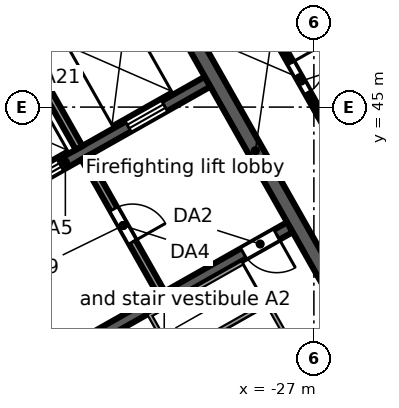
"""IFC4 building model, lengths in metres.
Left out: names, types, materials, properties, quantities, classifications, styles, units other than length and angle.
Written with IfcOpenShell. Run it as: python <this file> out.ifc"""

import sys

from ifc_helpers import new_model, si_unit, direction, frame, frame_2d, origin, place, context, subcontext, project, spatial, rectangle, extrude, element, fill, save


model = new_model("IFC4")
c1 = context("Model", 3, precision=1e-05, world=origin(), true_north=direction((0.0, 1.0)))
c2 = subcontext(c1, "Body", "Model", "MODEL_VIEW")
j1 = project(units=[si_unit("LENGTHUNIT", "METRE"), si_unit("PLANEANGLEUNIT", "RADIAN")], contexts=[c1])
p1 = place(None, origin())
s1 = spatial("IfcSite", under=j1, at=p1, CompositionType="ELEMENT")
p2 = place(p1, origin())
s2 = spatial("IfcBuilding", under=s1, at=p2, CompositionType="ELEMENT")
p3 = place(p2, frame((0.0, 0.0, 277.9)))
s3 = spatial("IfcBuildingStorey", under=s2, at=p3, CompositionType="ELEMENT", Elevation=277.9)
p4 = place(p3, frame((-58.732, 38.771, 0.0), z_axis=(0.0, 0.0, 1.0), x_axis=(0.870355615581, 0.492423702137, 0.0)))
e1 = element("IfcWall", 1, at=p4, inside=s3, PredefinedType="STANDARD", context=c2, shape_type="SweptSolid", body=[
    extrude(rectangle(XDim=64.052, YDim=0.25, at=frame_2d((32.026, 0.0))), origin(), (0.0, 0.0, 1.0), 3.52),
])
p5 = place(p4, frame((61.259, 0.0, 0.8)))
e2 = element("IfcOpeningElement", 2, at=p5, cuts=e1, PredefinedType="OPENING", context=c2, shape_type="SweptSolid", body=[
    extrude(rectangle(XDim=2.4, YDim=2.2, at=frame_2d((1.2, 1.1))), frame((0.0, 0.135, 0.0), z_axis=(0.0, -1.0, 0.0), x_axis=(1.0, 0.0, 0.0)), (0.0, 0.0, 1.0), 0.27),
])
p6 = place(p4, frame((58.216, 0.0, 0.8)))
e3 = element("IfcOpeningElement", 3, at=p6, cuts=e1, PredefinedType="OPENING", context=c2, shape_type="SweptSolid", body=[
    extrude(rectangle(XDim=2.4, YDim=2.2, at=frame_2d((1.2, 1.1))), frame((0.0, 0.135, 0.0), z_axis=(0.0, -1.0, 0.0), x_axis=(1.0, 0.0, 0.0)), (0.0, 0.0, 1.0), 0.27),
])
p7 = place(p4, frame((55.173, 0.0, 0.8)))
e4 = element("IfcOpeningElement", 4, at=p7, cuts=e1, PredefinedType="OPENING", context=c2, shape_type="SweptSolid", body=[
    extrude(rectangle(XDim=2.4, YDim=2.2, at=frame_2d((1.2, 1.1))), frame((0.0, 0.135, 0.0), z_axis=(0.0, -1.0, 0.0), x_axis=(1.0, 0.0, 0.0)), (0.0, 0.0, 1.0), 0.27),
])
p8 = place(p4, frame((52.129, 0.0, 0.8)))
e5 = element("IfcOpeningElement", 5, at=p8, cuts=e1, PredefinedType="OPENING", context=c2, shape_type="SweptSolid", body=[
    extrude(rectangle(XDim=2.4, YDim=2.2, at=frame_2d((1.2, 1.1))), frame((0.0, 0.135, 0.0), z_axis=(0.0, -1.0, 0.0), x_axis=(1.0, 0.0, 0.0)), (0.0, 0.0, 1.0), 0.27),
])
p9 = place(p4, frame((49.086, 0.0, 0.8)))
e6 = element("IfcOpeningElement", 6, at=p9, cuts=e1, PredefinedType="OPENING", context=c2, shape_type="SweptSolid", body=[
    extrude(rectangle(XDim=2.4, YDim=2.2, at=frame_2d((1.2, 1.1))), frame((0.0, 0.135, 0.0), z_axis=(0.0, -1.0, 0.0), x_axis=(1.0, 0.0, 0.0)), (0.0, 0.0, 1.0), 0.27),
])
p10 = place(p4, frame((46.043, 0.0, 0.8)))
e7 = element("IfcOpeningElement", 7, at=p10, cuts=e1, PredefinedType="OPENING", context=c2, shape_type="SweptSolid", body=[
    extrude(rectangle(XDim=2.4, YDim=2.2, at=frame_2d((1.2, 1.1))), frame((0.0, 0.135, 0.0), z_axis=(0.0, -1.0, 0.0), x_axis=(1.0, 0.0, 0.0)), (0.0, 0.0, 1.0), 0.27),
])
p11 = place(p4, frame((43.0, 0.0, 0.8)))
e8 = element("IfcOpeningElement", 8, at=p11, cuts=e1, PredefinedType="OPENING", context=c2, shape_type="SweptSolid", body=[
    extrude(rectangle(XDim=2.4, YDim=2.2, at=frame_2d((1.2, 1.1))), frame((0.0, 0.135, 0.0), z_axis=(0.0, -1.0, 0.0), x_axis=(1.0, 0.0, 0.0)), (0.0, 0.0, 1.0), 0.27),
])
p12 = place(p4, frame((39.956, 0.0, 0.8)))
e9 = element("IfcOpeningElement", 9, at=p12, cuts=e1, PredefinedType="OPENING", context=c2, shape_type="SweptSolid", body=[
    extrude(rectangle(XDim=2.4, YDim=2.2, at=frame_2d((1.2, 1.1))), frame((0.0, 0.135, 0.0), z_axis=(0.0, -1.0, 0.0), x_axis=(1.0, 0.0, 0.0)), (0.0, 0.0, 1.0), 0.27),
])
p13 = place(p4, frame((36.913, 0.0, 0.8)))
e10 = element("IfcOpeningElement", 10, at=p13, cuts=e1, PredefinedType="OPENING", context=c2, shape_type="SweptSolid", body=[
    extrude(rectangle(XDim=2.4, YDim=2.2, at=frame_2d((1.2, 1.1))), frame((0.0, 0.135, 0.0), z_axis=(0.0, -1.0, 0.0), x_axis=(1.0, 0.0, 0.0)), (0.0, 0.0, 1.0), 0.27),
])
p14 = place(p4, frame((33.87, 0.0, 0.8)))
e11 = element("IfcOpeningElement", 11, at=p14, cuts=e1, PredefinedType="OPENING", context=c2, shape_type="SweptSolid", body=[
    extrude(rectangle(XDim=2.4, YDim=2.2, at=frame_2d((1.2, 1.1))), frame((0.0, 0.135, 0.0), z_axis=(0.0, -1.0, 0.0), x_axis=(1.0, 0.0, 0.0)), (0.0, 0.0, 1.0), 0.27),
])
p15 = place(p4, frame((30.826, 0.0, 0.8)))
e12 = element("IfcOpeningElement", 12, at=p15, cuts=e1, PredefinedType="OPENING", context=c2, shape_type="SweptSolid", body=[
    extrude(rectangle(XDim=2.4, YDim=2.2, at=frame_2d((1.2, 1.1))), frame((0.0, 0.135, 0.0), z_axis=(0.0, -1.0, 0.0), x_axis=(1.0, 0.0, 0.0)), (0.0, 0.0, 1.0), 0.27),
])
p16 = place(p4, frame((27.783, 0.0, 0.8)))
e13 = element("IfcOpeningElement", 13, at=p16, cuts=e1, PredefinedType="OPENING", context=c2, shape_type="SweptSolid", body=[
    extrude(rectangle(XDim=2.4, YDim=2.2, at=frame_2d((1.2, 1.1))), frame((0.0, 0.135, 0.0), z_axis=(0.0, -1.0, 0.0), x_axis=(1.0, 0.0, 0.0)), (0.0, 0.0, 1.0), 0.27),
])
p17 = place(p4, frame((24.74, 0.0, 0.8)))
e14 = element("IfcOpeningElement", 14, at=p17, cuts=e1, PredefinedType="OPENING", context=c2, shape_type="SweptSolid", body=[
    extrude(rectangle(XDim=2.4, YDim=2.2, at=frame_2d((1.2, 1.1))), frame((0.0, 0.135, 0.0), z_axis=(0.0, -1.0, 0.0), x_axis=(1.0, 0.0, 0.0)), (0.0, 0.0, 1.0), 0.27),
])
p18 = place(p4, frame((21.696, 0.0, 0.8)))
e15 = element("IfcOpeningElement", 15, at=p18, cuts=e1, PredefinedType="OPENING", context=c2, shape_type="SweptSolid", body=[
    extrude(rectangle(XDim=2.4, YDim=2.2, at=frame_2d((1.2, 1.1))), frame((0.0, 0.135, 0.0), z_axis=(0.0, -1.0, 0.0), x_axis=(1.0, 0.0, 0.0)), (0.0, 0.0, 1.0), 0.27),
])
p19 = place(p4, frame((18.653, 0.0, 0.8)))
e16 = element("IfcOpeningElement", 16, at=p19, cuts=e1, PredefinedType="OPENING", context=c2, shape_type="SweptSolid", body=[
    extrude(rectangle(XDim=2.4, YDim=2.2, at=frame_2d((1.2, 1.1))), frame((0.0, 0.135, 0.0), z_axis=(0.0, -1.0, 0.0), x_axis=(1.0, 0.0, 0.0)), (0.0, 0.0, 1.0), 0.27),
])
p20 = place(p4, frame((15.61, 0.0, 0.8)))
e17 = element("IfcOpeningElement", 17, at=p20, cuts=e1, PredefinedType="OPENING", context=c2, shape_type="SweptSolid", body=[
    extrude(rectangle(XDim=2.4, YDim=2.2, at=frame_2d((1.2, 1.1))), frame((0.0, 0.135, 0.0), z_axis=(0.0, -1.0, 0.0), x_axis=(1.0, 0.0, 0.0)), (0.0, 0.0, 1.0), 0.27),
])
p21 = place(p4, frame((12.567, 0.0, 0.8)))
e18 = element("IfcOpeningElement", 18, at=p21, cuts=e1, PredefinedType="OPENING", context=c2, shape_type="SweptSolid", body=[
    extrude(rectangle(XDim=2.4, YDim=2.2, at=frame_2d((1.2, 1.1))), frame((0.0, 0.135, 0.0), z_axis=(0.0, -1.0, 0.0), x_axis=(1.0, 0.0, 0.0)), (0.0, 0.0, 1.0), 0.27),
])
p22 = place(p4, frame((9.523, 0.0, 0.8)))
e19 = element("IfcOpeningElement", 19, at=p22, cuts=e1, PredefinedType="OPENING", context=c2, shape_type="SweptSolid", body=[
    extrude(rectangle(XDim=2.4, YDim=2.2, at=frame_2d((1.2, 1.1))), frame((0.0, 0.135, 0.0), z_axis=(0.0, -1.0, 0.0), x_axis=(1.0, 0.0, 0.0)), (0.0, 0.0, 1.0), 0.27),
])
p23 = place(p4, frame((6.48, 0.0, 0.8)))
e20 = element("IfcOpeningElement", 20, at=p23, cuts=e1, PredefinedType="OPENING", context=c2, shape_type="SweptSolid", body=[
    extrude(rectangle(XDim=2.4, YDim=2.2, at=frame_2d((1.2, 1.1))), frame((0.0, 0.135, 0.0), z_axis=(0.0, -1.0, 0.0), x_axis=(1.0, 0.0, 0.0)), (0.0, 0.0, 1.0), 0.27),
])
p24 = place(p4, frame((3.437, 0.0, 0.8)))
e21 = element("IfcOpeningElement", 21, at=p24, cuts=e1, PredefinedType="OPENING", context=c2, shape_type="SweptSolid", body=[
    extrude(rectangle(XDim=2.4, YDim=2.2, at=frame_2d((1.2, 1.1))), frame((0.0, 0.135, 0.0), z_axis=(0.0, -1.0, 0.0), x_axis=(1.0, 0.0, 0.0)), (0.0, 0.0, 1.0), 0.27),
])
p25 = place(p4, frame((0.393, 0.0, 0.8)))
e22 = element("IfcOpeningElement", 22, at=p25, cuts=e1, PredefinedType="OPENING", context=c2, shape_type="SweptSolid", body=[
    extrude(rectangle(XDim=2.4, YDim=2.2, at=frame_2d((1.2, 1.1))), frame((0.0, 0.135, 0.0), z_axis=(0.0, -1.0, 0.0), x_axis=(1.0, 0.0, 0.0)), (0.0, 0.0, 1.0), 0.27),
])
p26 = place(p3, frame((-3.017, 46.293, 0.0), z_axis=(0.0, 0.0, 1.0), x_axis=(-0.870355474887, -0.492423950812, 0.0)))
e23 = element("IfcWall", 23, at=p26, inside=s3, PredefinedType="STANDARD", context=c2, shape_type="SweptSolid", body=[
    extrude(rectangle(XDim=40.34, YDim=0.25, at=frame_2d((20.17, 0.0))), origin(), (0.0, 0.0, 1.0), 3.52),
])
p27 = place(p26, frame((37.428, 0.0, 0.8)))
e24 = element("IfcOpeningElement", 24, at=p27, cuts=e23, PredefinedType="OPENING", context=c2, shape_type="SweptSolid", body=[
    extrude(rectangle(XDim=2.4, YDim=2.2, at=frame_2d((1.2, 1.1))), frame((0.0, 0.135, 0.0), z_axis=(0.0, -1.0, 0.0), x_axis=(1.0, 0.0, 0.0)), (0.0, 0.0, 1.0), 0.27),
])
p28 = place(p26, frame((34.372, 0.0, 0.0)))
e25 = element("IfcOpeningElement", 25, at=p28, cuts=e23, PredefinedType="OPENING", context=c2, shape_type="SweptSolid", body=[
    extrude(rectangle(XDim=1.8, YDim=2.4, at=frame_2d((0.9, 1.2))), frame((0.0, 0.135, 0.0), z_axis=(0.0, -1.0, 0.0), x_axis=(1.0, 0.0, 0.0)), (0.0, 0.0, 1.0), 0.27),
])
p29 = place(p26, frame((30.716, 0.0, 0.8)))
e26 = element("IfcOpeningElement", 26, at=p29, cuts=e23, PredefinedType="OPENING", context=c2, shape_type="SweptSolid", body=[
    extrude(rectangle(XDim=2.4, YDim=2.2, at=frame_2d((1.2, 1.1))), frame((0.0, 0.135, 0.0), z_axis=(0.0, -1.0, 0.0), x_axis=(1.0, 0.0, 0.0)), (0.0, 0.0, 1.0), 0.27),
])
p30 = place(p26, frame((27.36, 0.0, 0.8)))
e27 = element("IfcOpeningElement", 27, at=p30, cuts=e23, PredefinedType="OPENING", context=c2, shape_type="SweptSolid", body=[
    extrude(rectangle(XDim=2.4, YDim=2.2, at=frame_2d((1.2, 1.1))), frame((0.0, 0.135, 0.0), z_axis=(0.0, -1.0, 0.0), x_axis=(1.0, 0.0, 0.0)), (0.0, 0.0, 1.0), 0.27),
])
p31 = place(p26, frame((24.304, 0.0, 0.0)))
e28 = element("IfcOpeningElement", 28, at=p31, cuts=e23, PredefinedType="OPENING", context=c2, shape_type="SweptSolid", body=[
    extrude(rectangle(XDim=1.8, YDim=2.4, at=frame_2d((0.9, 1.2))), frame((0.0, 0.135, 0.0), z_axis=(0.0, -1.0, 0.0), x_axis=(1.0, 0.0, 0.0)), (0.0, 0.0, 1.0), 0.27),
])
p32 = place(p26, frame((20.648, 0.0, 0.8)))
e29 = element("IfcOpeningElement", 29, at=p32, cuts=e23, PredefinedType="OPENING", context=c2, shape_type="SweptSolid", body=[
    extrude(rectangle(XDim=2.4, YDim=2.2, at=frame_2d((1.2, 1.1))), frame((0.0, 0.135, 0.0), z_axis=(0.0, -1.0, 0.0), x_axis=(1.0, 0.0, 0.0)), (0.0, 0.0, 1.0), 0.27),
])
p33 = place(p26, frame((17.292, 0.0, 0.8)))
e30 = element("IfcOpeningElement", 30, at=p33, cuts=e23, PredefinedType="OPENING", context=c2, shape_type="SweptSolid", body=[
    extrude(rectangle(XDim=2.4, YDim=2.2, at=frame_2d((1.2, 1.1))), frame((0.0, 0.135, 0.0), z_axis=(0.0, -1.0, 0.0), x_axis=(1.0, 0.0, 0.0)), (0.0, 0.0, 1.0), 0.27),
])
p34 = place(p26, frame((14.236, 0.0, 0.0)))
e31 = element("IfcOpeningElement", 31, at=p34, cuts=e23, PredefinedType="OPENING", context=c2, shape_type="SweptSolid", body=[
    extrude(rectangle(XDim=1.8, YDim=2.4, at=frame_2d((0.9, 1.2))), frame((0.0, 0.135, 0.0), z_axis=(0.0, -1.0, 0.0), x_axis=(1.0, 0.0, 0.0)), (0.0, 0.0, 1.0), 0.27),
])
p35 = place(p26, frame((10.58, 0.0, 0.8)))
e32 = element("IfcOpeningElement", 32, at=p35, cuts=e23, PredefinedType="OPENING", context=c2, shape_type="SweptSolid", body=[
    extrude(rectangle(XDim=2.4, YDim=2.2, at=frame_2d((1.2, 1.1))), frame((0.0, 0.135, 0.0), z_axis=(0.0, -1.0, 0.0), x_axis=(1.0, 0.0, 0.0)), (0.0, 0.0, 1.0), 0.27),
])
p36 = place(p26, frame((7.224, 0.0, 0.8)))
e33 = element("IfcOpeningElement", 33, at=p36, cuts=e23, PredefinedType="OPENING", context=c2, shape_type="SweptSolid", body=[
    extrude(rectangle(XDim=2.4, YDim=2.2, at=frame_2d((1.2, 1.1))), frame((0.0, 0.135, 0.0), z_axis=(0.0, -1.0, 0.0), x_axis=(1.0, 0.0, 0.0)), (0.0, 0.0, 1.0), 0.27),
])
p37 = place(p26, frame((4.168, 0.0, 0.0)))
e34 = element("IfcOpeningElement", 34, at=p37, cuts=e23, PredefinedType="OPENING", context=c2, shape_type="SweptSolid", body=[
    extrude(rectangle(XDim=1.8, YDim=2.4, at=frame_2d((0.9, 1.2))), frame((0.0, 0.135, 0.0), z_axis=(0.0, -1.0, 0.0), x_axis=(1.0, 0.0, 0.0)), (0.0, 0.0, 1.0), 0.27),
])
p38 = place(p26, frame((0.512, 0.0, 0.8)))
e35 = element("IfcOpeningElement", 35, at=p38, cuts=e23, PredefinedType="OPENING", context=c2, shape_type="SweptSolid", body=[
    extrude(rectangle(XDim=2.4, YDim=2.2, at=frame_2d((1.2, 1.1))), frame((0.0, 0.135, 0.0), z_axis=(0.0, -1.0, 0.0), x_axis=(1.0, 0.0, 0.0)), (0.0, 0.0, 1.0), 0.27),
])
p39 = place(p3, frame((-34.245, 38.097, 0.0), z_axis=(0.0, 0.0, 1.0), x_axis=(0.870356351998, 0.492422400523, 0.0)))
e36 = element("IfcWall", 36, at=p39, inside=s3, PredefinedType="SOLIDWALL", context=c2, shape_type="SweptSolid", body=[
    extrude(rectangle(XDim=7.6, YDim=0.3, at=frame_2d((3.8, 0.0))), origin(), (0.0, 0.0, 1.0), 3.52),
])
p40 = place(p39, frame((6.2, 0.0, 0.0)))
e37 = element("IfcOpeningElement", 37, at=p40, cuts=e36, PredefinedType="OPENING", context=c2, shape_type="SweptSolid", body=[
    extrude(rectangle(XDim=1.0, YDim=2.1, at=frame_2d((0.5, 1.05))), frame((0.0, 0.16, 0.0), z_axis=(0.0, -1.0, 0.0), x_axis=(1.0, 0.0, 0.0)), (0.0, 0.0, 1.0), 0.32),
])
p41 = place(p3, frame((-37.282, 41.435, 0.0), z_axis=(0.0, 0.0, 1.0), x_axis=(0.870361315115, 0.492413628113, 0.0)))
e38 = element("IfcWall", 38, at=p41, inside=s3, PredefinedType="SOLIDWALL", context=c2, shape_type="SweptSolid", body=[
    extrude(rectangle(XDim=8.6, YDim=0.3, at=frame_2d((4.3, 0.0))), origin(), (0.0, 0.0, 1.0), 3.52),
])
p42 = place(p41, frame((0.65, 0.0, 0.0)))
e39 = element("IfcOpeningElement", 39, at=p42, cuts=e38, PredefinedType="OPENING", context=c2, shape_type="SweptSolid", body=[
    extrude(rectangle(XDim=1.1, YDim=2.1, at=frame_2d((0.55, 1.05))), frame((0.0, 0.16, 0.0), z_axis=(0.0, -1.0, 0.0), x_axis=(1.0, 0.0, 0.0)), (0.0, 0.0, 1.0), 0.32),
])
p43 = place(p41, frame((3.05, 0.0, 0.0)))
e40 = element("IfcOpeningElement", 40, at=p43, cuts=e38, PredefinedType="OPENING", context=c2, shape_type="SweptSolid", body=[
    extrude(rectangle(XDim=1.1, YDim=2.1, at=frame_2d((0.55, 1.05))), frame((0.0, 0.16, 0.0), z_axis=(0.0, -1.0, 0.0), x_axis=(1.0, 0.0, 0.0)), (0.0, 0.0, 1.0), 0.32),
])
p44 = place(p41, frame((6.2, 0.0, 0.0)))
e41 = element("IfcOpeningElement", 41, at=p44, cuts=e38, PredefinedType="OPENING", context=c2, shape_type="SweptSolid", body=[
    extrude(rectangle(XDim=1.1, YDim=2.1, at=frame_2d((0.55, 1.05))), frame((0.0, 0.16, 0.0), z_axis=(0.0, -1.0, 0.0), x_axis=(1.0, 0.0, 0.0)), (0.0, 0.0, 1.0), 0.32),
])
p45 = place(p3, frame((-46.51, 41.499, 0.0), z_axis=(0.0, 0.0, 1.0), x_axis=(0.870356271124, 0.492422543467, 0.0)))
e42 = element("IfcWall", 42, at=p45, inside=s3, PredefinedType="SOLIDWALL", context=c2, shape_type="SweptSolid", body=[
    extrude(rectangle(XDim=17.0, YDim=0.4, at=frame_2d((8.5, 0.0))), origin(), (0.0, 0.0, 1.0), 3.52),
])
p46 = place(p3, frame((-33.031, 43.667, 0.0), z_axis=(0.0, 0.0, 1.0), x_axis=(0.492408451753, -0.87036424366, 0.0)))
e43 = element("IfcWall", 43, at=p46, inside=s3, PredefinedType="PARTITIONING", context=c2, shape_type="SweptSolid", body=[
    extrude(rectangle(XDim=4.1, YDim=0.2, at=frame_2d((2.05, 0.0))), origin(), (0.0, 0.0, 1.0), 3.52),
])
p47 = place(p46, frame((1.55, 0.0, 0.0)))
e44 = element("IfcOpeningElement", 44, at=p47, cuts=e43, PredefinedType="OPENING", context=c2, shape_type="SweptSolid", body=[
    extrude(rectangle(XDim=1.0, YDim=2.1, at=frame_2d((0.5, 1.05))), frame((0.0, 0.11, 0.0), z_axis=(0.0, -1.0, 0.0), x_axis=(1.0, 0.0, 0.0)), (0.0, 0.0, 1.0), 0.22),
])
p48 = place(p3, frame((-35.271, 47.628, 0.0), z_axis=(0.0, 0.0, 1.0), x_axis=(0.492422543467, -0.870356271124, 0.0)))
e45 = element("IfcWall", 45, at=p48, inside=s3, PredefinedType="SOLIDWALL", context=c2, shape_type="SweptSolid", body=[
    extrude(rectangle(XDim=4.25, YDim=0.2, at=frame_2d((2.125, 0.0))), origin(), (0.0, 0.0, 1.0), 3.52),
])
p49 = place(p3, frame((-31.79, 49.597, 0.0), z_axis=(0.0, 0.0, 1.0), x_axis=(0.492421663121, -0.870356769198, 0.0)))
e46 = element("IfcWall", 46, at=p49, inside=s3, PredefinedType="SOLIDWALL", context=c2, shape_type="SweptSolid", body=[
    extrude(rectangle(XDim=13.2, YDim=0.4, at=frame_2d((6.6, 0.0))), origin(), (0.0, 0.0, 1.0), 3.52),
])
p50 = place(p3, frame((-27.827, 46.554, 0.0), z_axis=(0.0, 0.0, 1.0), x_axis=(0.492374954878, -0.870383193662, 0.0)))
e47 = element("IfcWall", 47, at=p50, inside=s3, PredefinedType="PARTITIONING", context=c2, shape_type="SweptSolid", body=[
    extrude(rectangle(XDim=2.0, YDim=0.15, at=frame_2d((1.0, 0.0))), origin(), (0.0, 0.0, 1.0), 2.792),
])
p51 = place(p50, frame((0.45, 0.0, 0.0)))
e48 = element("IfcOpeningElement", 48, at=p51, cuts=e47, PredefinedType="OPENING", context=c2, shape_type="SweptSolid", body=[
    extrude(rectangle(XDim=0.9, YDim=2.1, at=frame_2d((0.45, 1.05))), frame((0.0, 0.085, 0.0), z_axis=(0.0, -1.0, 0.0), x_axis=(1.0, 0.0, 0.0)), (0.0, 0.0, 1.0), 0.17),
])
p52 = place(p3, frame((-26.842, 44.813, 0.0), z_axis=(0.0, 0.0, 1.0), x_axis=(0.492365617434, -0.870388475779, 0.0)))
e49 = element("IfcWall", 49, at=p52, inside=s3, PredefinedType="PARTITIONING", context=c2, shape_type="SweptSolid", body=[
    extrude(rectangle(XDim=3.0, YDim=0.15, at=frame_2d((1.5, 0.0))), origin(), (0.0, 0.0, 1.0), 2.792),
])
p53 = place(p52, frame((0.95, 0.0, 0.0)))
e50 = element("IfcOpeningElement", 50, at=p53, cuts=e49, PredefinedType="OPENING", context=c2, shape_type="SweptSolid", body=[
    extrude(rectangle(XDim=0.9, YDim=2.1, at=frame_2d((0.45, 1.05))), frame((0.0, 0.085, 0.0), z_axis=(0.0, -1.0, 0.0), x_axis=(1.0, 0.0, 0.0)), (0.0, 0.0, 1.0), 0.17),
])
p54 = place(p43, origin())
e51 = element("IfcDoor", 51, at=p54, inside=s3, OperationType="DOUBLE_DOOR_SLIDING", PredefinedType="DOOR", context=c2, shape_type="SweptSolid", body=[
    extrude(rectangle(XDim=1.1, YDim=2.1, at=frame_2d((0.55, 1.05))), frame((0.0, 0.025, 0.0), z_axis=(0.0, -1.0, 0.0), x_axis=(1.0, 0.0, 0.0)), (0.0, 0.0, 1.0), 0.05),
])
fill(e40, e51)
p55 = place(p44, origin())
e52 = element("IfcDoor", 52, at=p55, inside=s3, OperationType="DOUBLE_DOOR_SLIDING", PredefinedType="DOOR", context=c2, shape_type="SweptSolid", body=[
    extrude(rectangle(XDim=1.1, YDim=2.1, at=frame_2d((0.55, 1.05))), frame((0.0, 0.025, 0.0), z_axis=(0.0, -1.0, 0.0), x_axis=(1.0, 0.0, 0.0)), (0.0, 0.0, 1.0), 0.05),
])
fill(e41, e52)
p56 = place(p40, frame((1.0, 0.0, 0.0), z_axis=(0.0, 0.0, 1.0), x_axis=(-1.0, 0.0, 0.0)))
e53 = element("IfcDoor", 53, at=p56, inside=s3, OperationType="SINGLE_SWING_LEFT", PredefinedType="DOOR", context=c2, shape_type="SweptSolid", body=[
    extrude(rectangle(XDim=1.0, YDim=2.1, at=frame_2d((0.5, 1.05))), frame((0.0, 0.025, 0.0), z_axis=(0.0, -1.0, 0.0), x_axis=(1.0, 0.0, 0.0)), (0.0, 0.0, 1.0), 0.05),
])
fill(e37, e53)
p57 = place(p47, origin())
e54 = element("IfcDoor", 54, at=p57, inside=s3, OperationType="SINGLE_SWING_RIGHT", PredefinedType="DOOR", context=c2, shape_type="SweptSolid", body=[
    extrude(rectangle(XDim=1.0, YDim=2.1, at=frame_2d((0.5, 1.05))), frame((0.0, 0.025, 0.0), z_axis=(0.0, -1.0, 0.0), x_axis=(1.0, 0.0, 0.0)), (0.0, 0.0, 1.0), 0.05),
])
fill(e44, e54)
p58 = place(p51, origin())
e55 = element("IfcDoor", 55, at=p58, inside=s3, OperationType="SINGLE_SWING_LEFT", PredefinedType="DOOR", context=c2, shape_type="SweptSolid", body=[
    extrude(rectangle(XDim=0.9, YDim=2.1, at=frame_2d((0.45, 1.05))), frame((0.0, 0.025, 0.0), z_axis=(0.0, -1.0, 0.0), x_axis=(1.0, 0.0, 0.0)), (0.0, 0.0, 1.0), 0.05),
])
fill(e48, e55)
save(model, sys.argv[1])
